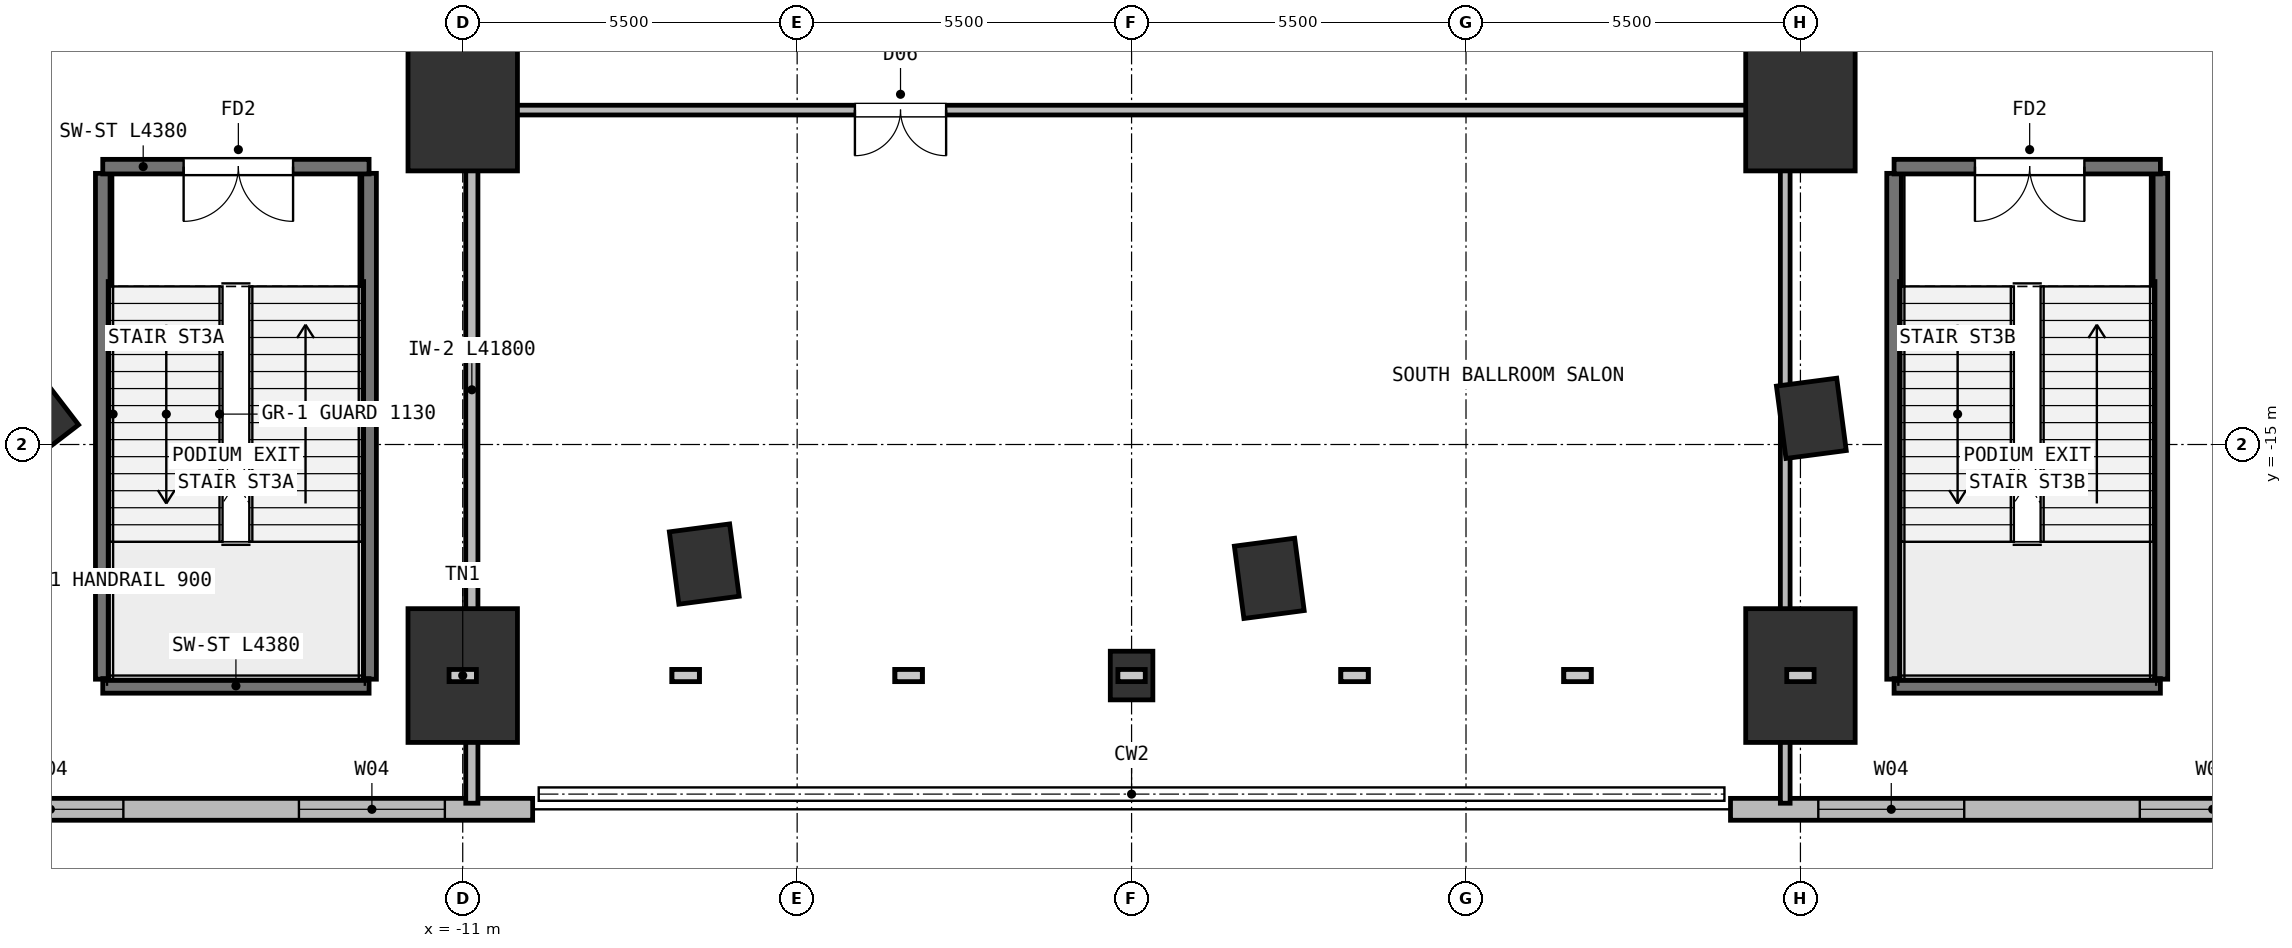
"""IFC4 building model, lengths in metres.
Left out: names, types, materials, properties, quantities, classifications, styles, units other than length and angle.
Written with IfcOpenShell. Run it as: python <this file> out.ifc"""

import sys

from ifc_helpers import new_model, si_unit, direction, frame, frame_2d, origin, origin_2d, place, context, subcontext, project, spatial, rectangle, extrude, element, fill, save


model = new_model("IFC4")
c1 = context("Model", 3, precision=1e-05, world=origin(), true_north=direction((0.0, 1.0)))
c2 = subcontext(c1, "Body", "Model", "MODEL_VIEW")
j1 = project(units=[si_unit("LENGTHUNIT", "METRE"), si_unit("PLANEANGLEUNIT", "RADIAN")], contexts=[c1])
p1 = place(None, origin())
s1 = spatial("IfcSite", under=j1, at=p1, CompositionType="ELEMENT")
p2 = place(p1, origin())
s2 = spatial("IfcBuilding", under=s1, at=p2, CompositionType="ELEMENT")
p3 = place(p2, frame((0.0, 0.0, 16.0)))
s3 = spatial("IfcBuildingStorey", under=s2, at=p3, CompositionType="ELEMENT", Elevation=16.0)
p4 = place(p3, frame((-18.702, -14.351, 0.0), z_axis=(0.0, 0.0, 1.0), x_axis=(0.793353340291, 0.608761429009, 0.0)))
e1 = element("IfcColumn", 1, at=p4, inside=s3, PredefinedType="COLUMN", context=c2, shape_type="SweptSolid", body=[
    extrude(rectangle(XDim=1.8, YDim=2.2, at=origin_2d()), origin(), (0.0, 0.0, 1.0), 5.5),
])
for number, where, z_axis, x_axis in (
    (2, (-7.028, -16.966, -0.34), (0.0, 0.0, 1.0), (0.991, 0.131, 0.0)),
    (3, (2.265, -17.202, -0.34), (0.0, 0.0, 1.0), (0.991, 0.131, 0.0)),
):
    element("IfcColumn", number, at=place(p3, frame(where, z_axis=z_axis, x_axis=x_axis)), inside=s3, PredefinedType="COLUMN", context=c2, shape_type="SweptSolid", body=[
        extrude(rectangle(XDim=1.0, YDim=1.2, at=origin_2d()), origin(), (0.0, 0.0, 1.0), 5.84),
    ])
p5 = place(p3, frame((11.179, -14.569, 0.0), z_axis=(0.0, 0.0, 1.0), x_axis=(0.991444861374, 0.13052619222, 0.0)))
e4 = element("IfcColumn", 4, at=p5, inside=s3, PredefinedType="COLUMN", context=c2, shape_type="SweptSolid", body=[
    extrude(rectangle(XDim=1.0, YDim=1.2, at=origin_2d()), origin(), (0.0, 0.0, 1.0), 5.5),
])
for number, where, z_axis, x_axis in (
    (5, (-11.0, -18.8, 0.0), (0.0, 0.0, 1.0), (1.0, 0.0, 0.0)),
    (6, (-11.0, -9.4, 0.0), (0.0, 0.0, 1.0), (1.0, 0.0, 0.0)),
    (7, (11.0, -18.8, 0.0), (0.0, 0.0, 1.0), (1.0, 0.0, 0.0)),
    (8, (11.0, -9.4, 0.0), (0.0, 0.0, 1.0), (1.0, 0.0, 0.0)),
):
    element("IfcColumn", number, at=place(p3, frame(where, z_axis=z_axis, x_axis=x_axis)), inside=s3, PredefinedType="COLUMN", context=c2, shape_type="SweptSolid", body=[
        extrude(rectangle(XDim=1.8, YDim=2.2, at=origin_2d()), origin(), (0.0, 0.0, 1.0), 5.5),
    ])
p6 = place(p3, frame((0.0, -18.8, 0.0), z_axis=(0.0, 0.0, 1.0), x_axis=(1.0, 0.0, 0.0)))
e9 = element("IfcColumn", 9, at=p6, inside=s3, PredefinedType="COLUMN", context=c2, shape_type="SweptSolid", body=[
    extrude(rectangle(XDim=0.7, YDim=0.8, at=origin_2d()), origin(), (0.0, 0.0, 1.0), 5.5),
])
p7 = place(p3, frame((-9.85, -21.0, 0.0), z_axis=(0.0, 0.0, 1.0), x_axis=(-1.0, 0.0, 0.0)))
e10 = element("IfcWall", 10, at=p7, inside=s3, PredefinedType="SOLIDWALL", context=c2, shape_type="SweptSolid", body=[
    extrude(rectangle(XDim=21.15, YDim=0.36, at=frame_2d((10.575, 0.0))), origin(), (0.0, 0.0, 1.0), 5.22),
])
p8 = place(p7, frame((1.444, 0.0, 0.95)))
e11 = element("IfcOpeningElement", 11, at=p8, cuts=e10, PredefinedType="OPENING", context=c2, shape_type="SweptSolid", body=[
    extrude(rectangle(XDim=2.4, YDim=2.6, at=frame_2d((1.2, 1.3))), frame((0.0, 0.19, 0.0), z_axis=(0.0, -1.0, 0.0), x_axis=(1.0, 0.0, 0.0)), (0.0, 0.0, 1.0), 0.38),
])
p9 = place(p7, frame((6.731, 0.0, 0.95)))
e12 = element("IfcOpeningElement", 12, at=p9, cuts=e10, PredefinedType="OPENING", context=c2, shape_type="SweptSolid", body=[
    extrude(rectangle(XDim=2.4, YDim=2.6, at=frame_2d((1.2, 1.3))), frame((0.0, 0.19, 0.0), z_axis=(0.0, -1.0, 0.0), x_axis=(1.0, 0.0, 0.0)), (0.0, 0.0, 1.0), 0.38),
])
p10 = place(p7, frame((12.019, 0.0, 0.95)))
e13 = element("IfcOpeningElement", 13, at=p10, cuts=e10, PredefinedType="OPENING", context=c2, shape_type="SweptSolid", body=[
    extrude(rectangle(XDim=2.4, YDim=2.6, at=frame_2d((1.2, 1.3))), frame((0.0, 0.19, 0.0), z_axis=(0.0, -1.0, 0.0), x_axis=(1.0, 0.0, 0.0)), (0.0, 0.0, 1.0), 0.38),
])
p11 = place(p7, frame((17.306, 0.0, 0.95)))
e14 = element("IfcOpeningElement", 14, at=p11, cuts=e10, PredefinedType="OPENING", context=c2, shape_type="SweptSolid", body=[
    extrude(rectangle(XDim=2.4, YDim=2.6, at=frame_2d((1.2, 1.3))), frame((0.0, 0.19, 0.0), z_axis=(0.0, -1.0, 0.0), x_axis=(1.0, 0.0, 0.0)), (0.0, 0.0, 1.0), 0.38),
])
p12 = place(p3, frame((31.0, -21.0, 0.0), z_axis=(0.0, 0.0, 1.0), x_axis=(-1.0, 0.0, 0.0)))
e15 = element("IfcWall", 15, at=p12, inside=s3, PredefinedType="SOLIDWALL", context=c2, shape_type="SweptSolid", body=[
    extrude(rectangle(XDim=21.15, YDim=0.36, at=frame_2d((10.575, 0.0))), origin(), (0.0, 0.0, 1.0), 5.22),
])
p13 = place(p12, frame((1.444, 0.0, 0.95)))
e16 = element("IfcOpeningElement", 16, at=p13, cuts=e15, PredefinedType="OPENING", context=c2, shape_type="SweptSolid", body=[
    extrude(rectangle(XDim=2.4, YDim=2.6, at=frame_2d((1.2, 1.3))), frame((0.0, 0.19, 0.0), z_axis=(0.0, -1.0, 0.0), x_axis=(1.0, 0.0, 0.0)), (0.0, 0.0, 1.0), 0.38),
])
p14 = place(p12, frame((6.731, 0.0, 0.95)))
e17 = element("IfcOpeningElement", 17, at=p14, cuts=e15, PredefinedType="OPENING", context=c2, shape_type="SweptSolid", body=[
    extrude(rectangle(XDim=2.4, YDim=2.6, at=frame_2d((1.2, 1.3))), frame((0.0, 0.19, 0.0), z_axis=(0.0, -1.0, 0.0), x_axis=(1.0, 0.0, 0.0)), (0.0, 0.0, 1.0), 0.38),
])
p15 = place(p12, frame((12.019, 0.0, 0.95)))
e18 = element("IfcOpeningElement", 18, at=p15, cuts=e15, PredefinedType="OPENING", context=c2, shape_type="SweptSolid", body=[
    extrude(rectangle(XDim=2.4, YDim=2.6, at=frame_2d((1.2, 1.3))), frame((0.0, 0.19, 0.0), z_axis=(0.0, -1.0, 0.0), x_axis=(1.0, 0.0, 0.0)), (0.0, 0.0, 1.0), 0.38),
])
p16 = place(p12, frame((17.306, 0.0, 0.95)))
e19 = element("IfcOpeningElement", 19, at=p16, cuts=e15, PredefinedType="OPENING", context=c2, shape_type="SweptSolid", body=[
    extrude(rectangle(XDim=2.4, YDim=2.6, at=frame_2d((1.2, 1.3))), frame((0.0, 0.19, 0.0), z_axis=(0.0, -1.0, 0.0), x_axis=(1.0, 0.0, 0.0)), (0.0, 0.0, 1.0), 0.38),
])
for number, where, z_axis, x_axis in (
    (20, (-16.92, -18.86, 0.0), (0.0, 0.0, 1.0), (0.0, 1.0, 0.0)),
    (21, (-12.54, -18.86, 0.0), (0.0, 0.0, 1.0), (0.0, 1.0, 0.0)),
):
    element("IfcWall", number, at=place(p3, frame(where, z_axis=z_axis, x_axis=x_axis)), inside=s3, PredefinedType="SHEAR", context=c2, shape_type="SweptSolid", body=[
        extrude(rectangle(XDim=8.32, YDim=0.24, at=frame_2d((4.16, 0.0))), origin(), (0.0, 0.0, 1.0), 5.22),
    ])
p17 = place(p3, frame((-16.92, -18.97, 0.0), z_axis=(0.0, 0.0, 1.0), x_axis=(1.0, 0.0, 0.0)))
e22 = element("IfcWall", 22, at=p17, inside=s3, PredefinedType="SHEAR", context=c2, shape_type="SweptSolid", body=[
    extrude(rectangle(XDim=4.38, YDim=0.24, at=frame_2d((2.19, 0.0))), origin(), (0.0, 0.0, 1.0), 5.22),
])
p18 = place(p3, frame((-12.54, -10.43, 0.0), z_axis=(0.0, 0.0, 1.0), x_axis=(-1.0, 0.0, 0.0)))
e23 = element("IfcWall", 23, at=p18, inside=s3, PredefinedType="SHEAR", context=c2, shape_type="SweptSolid", body=[
    extrude(rectangle(XDim=4.38, YDim=0.24, at=frame_2d((2.19, 0.0))), origin(), (0.0, 0.0, 1.0), 5.22),
])
p19 = place(p18, frame((1.25, 0.0, 0.0)))
e24 = element("IfcOpeningElement", 24, at=p19, cuts=e23, PredefinedType="OPENING", context=c2, shape_type="SweptSolid", body=[
    extrude(rectangle(XDim=1.8, YDim=2.2, at=frame_2d((0.9, 1.1))), frame((0.0, 0.13, 0.0), z_axis=(0.0, -1.0, 0.0), x_axis=(1.0, 0.0, 0.0)), (0.0, 0.0, 1.0), 0.26),
])
for number, where, z_axis, x_axis in (
    (25, (12.54, -18.86, 0.0), (0.0, 0.0, 1.0), (0.0, 1.0, 0.0)),
    (26, (16.92, -18.86, 0.0), (0.0, 0.0, 1.0), (0.0, 1.0, 0.0)),
):
    element("IfcWall", number, at=place(p3, frame(where, z_axis=z_axis, x_axis=x_axis)), inside=s3, PredefinedType="SHEAR", context=c2, shape_type="SweptSolid", body=[
        extrude(rectangle(XDim=8.32, YDim=0.24, at=frame_2d((4.16, 0.0))), origin(), (0.0, 0.0, 1.0), 5.22),
    ])
p20 = place(p3, frame((12.54, -18.97, 0.0), z_axis=(0.0, 0.0, 1.0), x_axis=(1.0, 0.0, 0.0)))
e27 = element("IfcWall", 27, at=p20, inside=s3, PredefinedType="SHEAR", context=c2, shape_type="SweptSolid", body=[
    extrude(rectangle(XDim=4.38, YDim=0.24, at=frame_2d((2.19, 0.0))), origin(), (0.0, 0.0, 1.0), 5.22),
])
p21 = place(p3, frame((16.92, -10.43, 0.0), z_axis=(0.0, 0.0, 1.0), x_axis=(-1.0, 0.0, 0.0)))
e28 = element("IfcWall", 28, at=p21, inside=s3, PredefinedType="SHEAR", context=c2, shape_type="SweptSolid", body=[
    extrude(rectangle(XDim=4.38, YDim=0.24, at=frame_2d((2.19, 0.0))), origin(), (0.0, 0.0, 1.0), 5.22),
])
p22 = place(p21, frame((1.25, 0.0, 0.0)))
e29 = element("IfcOpeningElement", 29, at=p22, cuts=e28, PredefinedType="OPENING", context=c2, shape_type="SweptSolid", body=[
    extrude(rectangle(XDim=1.8, YDim=2.2, at=frame_2d((0.9, 1.1))), frame((0.0, 0.13, 0.0), z_axis=(0.0, -1.0, 0.0), x_axis=(1.0, 0.0, 0.0)), (0.0, 0.0, 1.0), 0.26),
])
p23 = place(p3, frame((-10.85, -20.9, 0.0), z_axis=(0.0, 0.0, 1.0), x_axis=(0.0, 1.0, 0.0)))
e30 = element("IfcWall", 30, at=p23, inside=s3, PredefinedType="PARTITIONING", context=c2, shape_type="SweptSolid", body=[
    extrude(rectangle(XDim=41.8, YDim=0.2, at=frame_2d((20.9, 0.0))), origin(), (0.0, 0.0, 1.0), 4.6),
])
p24 = place(p23, frame((17.0, 0.0, 0.0)))
e31 = element("IfcOpeningElement", 31, at=p24, cuts=e30, PredefinedType="OPENING", context=c2, shape_type="SweptSolid", body=[
    extrude(rectangle(XDim=2.2, YDim=2.3, at=frame_2d((1.1, 1.15))), frame((0.0, 0.11, 0.0), z_axis=(0.0, -1.0, 0.0), x_axis=(1.0, 0.0, 0.0)), (0.0, 0.0, 1.0), 0.22),
])
p25 = place(p3, frame((10.75, -9.5, 0.0), z_axis=(0.0, 0.0, 1.0), x_axis=(-1.0, 0.0, 0.0)))
e32 = element("IfcWall", 32, at=p25, inside=s3, PredefinedType="PARTITIONING", context=c2, shape_type="SweptSolid", body=[
    extrude(rectangle(XDim=21.5, YDim=0.16, at=frame_2d((10.75, 0.0))), origin(), (0.0, 0.0, 1.0), 4.3),
])
p26 = place(p25, frame((13.8, 0.0, 0.0)))
e33 = element("IfcOpeningElement", 33, at=p26, cuts=e32, PredefinedType="OPENING", context=c2, shape_type="SweptSolid", body=[
    extrude(rectangle(XDim=1.5, YDim=2.2, at=frame_2d((0.75, 1.1))), frame((0.0, 0.09, 0.0), z_axis=(0.0, -1.0, 0.0), x_axis=(1.0, 0.0, 0.0)), (0.0, 0.0, 1.0), 0.18),
])
p27 = place(p3, frame((10.75, -20.9, 0.0), z_axis=(0.0, 0.0, 1.0), x_axis=(0.0, 1.0, 0.0)))
e34 = element("IfcWall", 34, at=p27, inside=s3, PredefinedType="PARTITIONING", context=c2, shape_type="SweptSolid", body=[
    extrude(rectangle(XDim=11.3, YDim=0.16, at=frame_2d((5.65, 0.0))), origin(), (0.0, 0.0, 1.0), 5.22),
])
p28 = place(p8, origin())
e35 = element("IfcWindow", 35, at=p28, inside=s3, PartitioningType="SINGLE_PANEL", PredefinedType="WINDOW", context=c2, shape_type="SweptSolid", body=[
    extrude(rectangle(XDim=2.4, YDim=2.6, at=frame_2d((1.2, 1.3))), frame((0.0, 0.03, 0.0), z_axis=(0.0, -1.0, 0.0), x_axis=(1.0, 0.0, 0.0)), (0.0, 0.0, 1.0), 0.06),
])
fill(e11, e35)
p29 = place(p9, origin())
e36 = element("IfcWindow", 36, at=p29, inside=s3, PartitioningType="SINGLE_PANEL", PredefinedType="WINDOW", context=c2, shape_type="SweptSolid", body=[
    extrude(rectangle(XDim=2.4, YDim=2.6, at=frame_2d((1.2, 1.3))), frame((0.0, 0.03, 0.0), z_axis=(0.0, -1.0, 0.0), x_axis=(1.0, 0.0, 0.0)), (0.0, 0.0, 1.0), 0.06),
])
fill(e12, e36)
p30 = place(p15, origin())
e37 = element("IfcWindow", 37, at=p30, inside=s3, PartitioningType="SINGLE_PANEL", PredefinedType="WINDOW", context=c2, shape_type="SweptSolid", body=[
    extrude(rectangle(XDim=2.4, YDim=2.6, at=frame_2d((1.2, 1.3))), frame((0.0, 0.03, 0.0), z_axis=(0.0, -1.0, 0.0), x_axis=(1.0, 0.0, 0.0)), (0.0, 0.0, 1.0), 0.06),
])
fill(e18, e37)
p31 = place(p16, origin())
e38 = element("IfcWindow", 38, at=p31, inside=s3, PartitioningType="SINGLE_PANEL", PredefinedType="WINDOW", context=c2, shape_type="SweptSolid", body=[
    extrude(rectangle(XDim=2.4, YDim=2.6, at=frame_2d((1.2, 1.3))), frame((0.0, 0.03, 0.0), z_axis=(0.0, -1.0, 0.0), x_axis=(1.0, 0.0, 0.0)), (0.0, 0.0, 1.0), 0.06),
])
fill(e19, e38)
p32 = place(p19, origin())
e39 = element("IfcDoor", 39, at=p32, inside=s3, OperationType="DOUBLE_DOOR_SINGLE_SWING", PredefinedType="DOOR", context=c2, shape_type="SweptSolid", body=[
    extrude(rectangle(XDim=1.8, YDim=2.2, at=frame_2d((0.9, 1.1))), frame((0.0, 0.025, 0.0), z_axis=(0.0, -1.0, 0.0), x_axis=(1.0, 0.0, 0.0)), (0.0, 0.0, 1.0), 0.05),
])
fill(e24, e39)
p33 = place(p22, origin())
e40 = element("IfcDoor", 40, at=p33, inside=s3, OperationType="DOUBLE_DOOR_SINGLE_SWING", PredefinedType="DOOR", context=c2, shape_type="SweptSolid", body=[
    extrude(rectangle(XDim=1.8, YDim=2.2, at=frame_2d((0.9, 1.1))), frame((0.0, 0.025, 0.0), z_axis=(0.0, -1.0, 0.0), x_axis=(1.0, 0.0, 0.0)), (0.0, 0.0, 1.0), 0.05),
])
fill(e29, e40)
p34 = place(p26, origin())
e41 = element("IfcDoor", 41, at=p34, inside=s3, OperationType="DOUBLE_DOOR_SINGLE_SWING", PredefinedType="DOOR", context=c2, shape_type="SweptSolid", body=[
    extrude(rectangle(XDim=1.5, YDim=2.2, at=frame_2d((0.75, 1.1))), frame((0.0, 0.025, 0.0), z_axis=(0.0, -1.0, 0.0), x_axis=(1.0, 0.0, 0.0)), (0.0, 0.0, 1.0), 0.05),
])
fill(e33, e41)
save(model, sys.argv[1])
